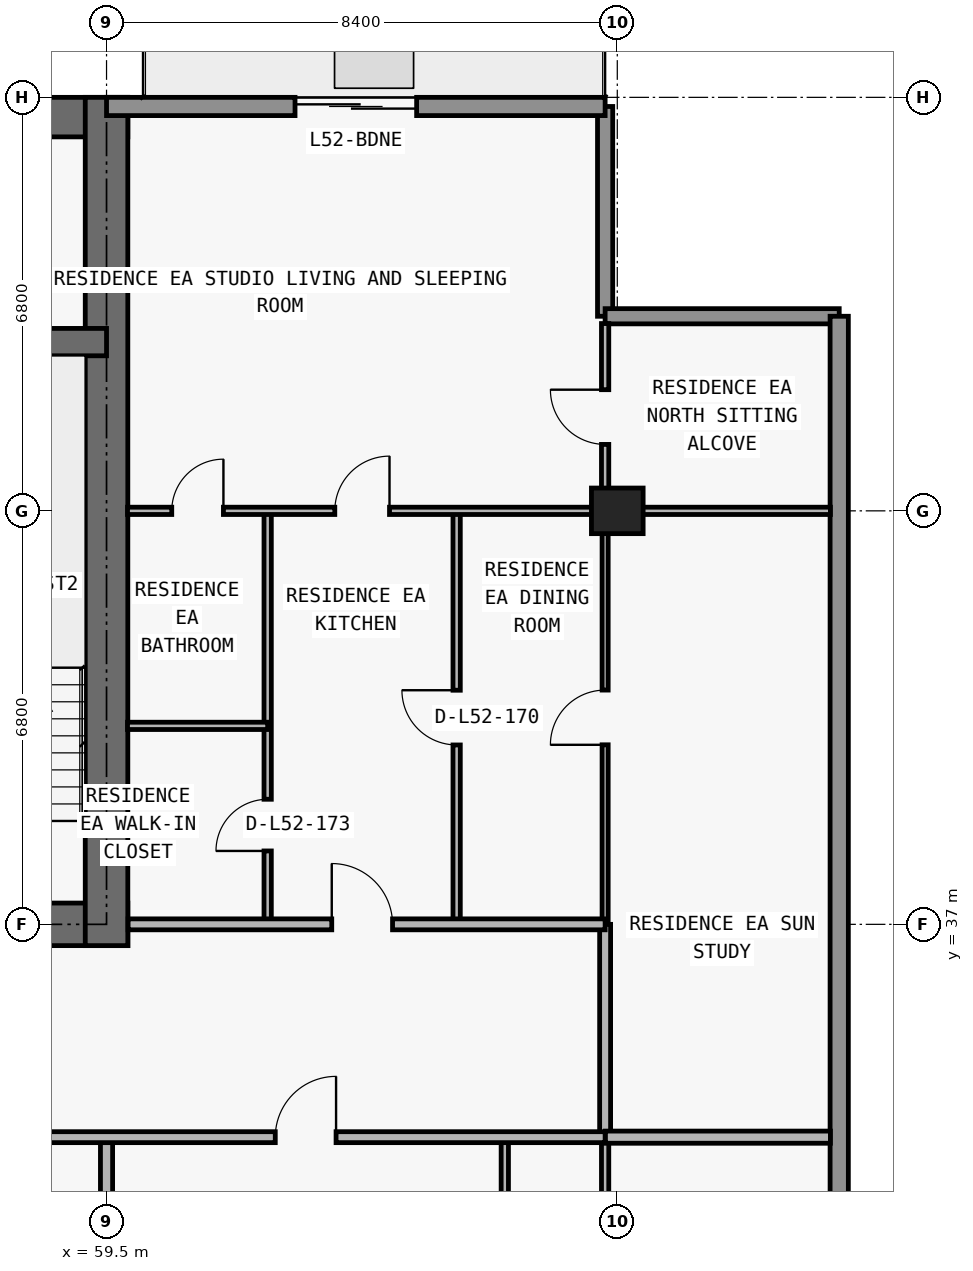
"""IFC4 building model, lengths in metres.
Left out: names, types, materials, properties, quantities, classifications, styles, units other than length and angle.
Written with IfcOpenShell. Run it as: python <this file> out.ifc"""

import sys

from ifc_helpers import new_model, si_unit, direction, frame, frame_2d, origin, origin_2d, place, context, subcontext, project, spatial, rectangle, extrude, element, fill, save


model = new_model("IFC4")
c1 = context("Model", 3, precision=1e-05, world=origin(), true_north=direction((0.0, 1.0)))
c2 = subcontext(c1, "Body", "Model", "MODEL_VIEW")
j1 = project(units=[si_unit("LENGTHUNIT", "METRE"), si_unit("PLANEANGLEUNIT", "RADIAN")], contexts=[c1])
p1 = place(None, origin())
s1 = spatial("IfcSite", under=j1, at=p1, CompositionType="ELEMENT")
p2 = place(p1, origin())
s2 = spatial("IfcBuilding", under=s1, at=p2, CompositionType="ELEMENT")
p3 = place(p2, frame((0.0, 0.0, 188.4)))
s3 = spatial("IfcBuildingStorey", under=s2, at=p3, CompositionType="ELEMENT", Elevation=188.4)
p4 = place(p3, frame((67.9, 43.8, 0.0), z_axis=(0.0, 0.0, 1.0), x_axis=(1.0, 0.0, 0.0)))
e1 = element("IfcColumn", 1, at=p4, inside=s3, PredefinedType="COLUMN", context=c2, shape_type="SweptSolid", body=[
    extrude(rectangle(XDim=0.85, YDim=0.75, at=origin_2d()), origin(), (0.0, 0.0, 1.0), 3.05),
])
p5 = place(p3, frame((17.95, 37.0, 0.0), z_axis=(0.0, 0.0, 1.0), x_axis=(1.0, 0.0, 0.0)))
e2 = element("IfcWall", 2, at=p5, inside=s3, PredefinedType="SHEAR", context=c2, shape_type="SweptSolid", body=[
    extrude(rectangle(XDim=41.9, YDim=0.7, at=frame_2d((20.95, 0.0))), origin(), (0.0, 0.0, 1.0), 3.05),
])
p6 = place(p5, frame((14.35, 0.0, 0.0)))
e3 = element("IfcOpeningElement", 3, at=p6, cuts=e2, PredefinedType="OPENING", context=c2, shape_type="SweptSolid", body=[
    extrude(rectangle(XDim=1.1, YDim=2.15, at=frame_2d((0.55, 1.075))), frame((0.0, 0.36, 0.0), z_axis=(0.0, -1.0, 0.0), x_axis=(1.0, 0.0, 0.0)), (0.0, 0.0, 1.0), 0.72),
])
p7 = place(p5, frame((6.2, 0.0, 0.0)))
e4 = element("IfcOpeningElement", 4, at=p7, cuts=e2, PredefinedType="OPENING", context=c2, shape_type="SweptSolid", body=[
    extrude(rectangle(XDim=1.05, YDim=2.15, at=frame_2d((0.525, 1.075))), frame((0.0, 0.36, 0.0), z_axis=(0.0, -1.0, 0.0), x_axis=(1.0, 0.0, 0.0)), (0.0, 0.0, 1.0), 0.72),
])
p8 = place(p5, frame((34.7, 0.0, 0.0)))
e5 = element("IfcOpeningElement", 5, at=p8, cuts=e2, PredefinedType="OPENING", context=c2, shape_type="SweptSolid", body=[
    extrude(rectangle(XDim=1.05, YDim=2.15, at=frame_2d((0.525, 1.075))), frame((0.0, 0.36, 0.0), z_axis=(0.0, -1.0, 0.0), x_axis=(1.0, 0.0, 0.0)), (0.0, 0.0, 1.0), 0.72),
])
p9 = place(p5, frame((10.812, 0.0, 0.0)))
e6 = element("IfcOpeningElement", 6, at=p9, cuts=e2, PredefinedType="OPENING", context=c2, shape_type="SweptSolid", body=[
    extrude(rectangle(XDim=1.05, YDim=2.15, at=frame_2d((0.525, 1.075))), frame((0.0, 0.36, 0.0), z_axis=(0.0, -1.0, 0.0), x_axis=(1.0, 0.0, 0.0)), (0.0, 0.0, 1.0), 0.72),
])
p10 = place(p5, frame((24.05, 0.0, 0.0)))
e7 = element("IfcOpeningElement", 7, at=p10, cuts=e2, PredefinedType="OPENING", context=c2, shape_type="SweptSolid", body=[
    extrude(rectangle(XDim=1.05, YDim=2.15, at=frame_2d((0.525, 1.075))), frame((0.0, 0.36, 0.0), z_axis=(0.0, -1.0, 0.0), x_axis=(1.0, 0.0, 0.0)), (0.0, 0.0, 1.0), 0.72),
])
p11 = place(p3, frame((17.95, 50.275, 0.0), z_axis=(0.0, 0.0, 1.0), x_axis=(1.0, 0.0, 0.0)))
e8 = element("IfcWall", 8, at=p11, inside=s3, PredefinedType="SHEAR", context=c2, shape_type="SweptSolid", body=[
    extrude(rectangle(XDim=41.9, YDim=0.65, at=frame_2d((20.95, 0.0))), origin(), (0.0, 0.0, 1.0), 3.05),
])
p12 = place(p3, frame((59.5, 36.65, 0.0), z_axis=(0.0, 0.0, 1.0), x_axis=(0.0, 1.0, 0.0)))
e9 = element("IfcWall", 9, at=p12, inside=s3, PredefinedType="SHEAR", context=c2, shape_type="SweptSolid", body=[
    extrude(rectangle(XDim=13.95, YDim=0.7, at=frame_2d((6.975, 0.0))), origin(), (0.0, 0.0, 1.0), 3.05),
])
p13 = place(p3, frame((18.3, 46.575, 0.0), z_axis=(0.0, 0.0, 1.0), x_axis=(1.0, 0.0, 0.0)))
e10 = element("IfcWall", 10, at=p13, inside=s3, PredefinedType="SHEAR", context=c2, shape_type="SweptSolid", body=[
    extrude(rectangle(XDim=41.2, YDim=0.45, at=frame_2d((20.6, 0.0))), origin(), (0.0, 0.0, 1.0), 3.05),
])
p14 = place(p13, frame((7.575, 0.0, 0.0)))
e11 = element("IfcOpeningElement", 11, at=p14, cuts=e10, PredefinedType="OPENING", context=c2, shape_type="SweptSolid", body=[
    extrude(rectangle(XDim=1.05, YDim=2.15, at=frame_2d((0.525, 1.075))), frame((0.0, 0.235, 0.0), z_axis=(0.0, -1.0, 0.0), x_axis=(1.0, 0.0, 0.0)), (0.0, 0.0, 1.0), 0.47),
])
p15 = place(p13, frame((32.625, 0.0, 0.0)))
e12 = element("IfcOpeningElement", 12, at=p15, cuts=e10, PredefinedType="OPENING", context=c2, shape_type="SweptSolid", body=[
    extrude(rectangle(XDim=1.05, YDim=2.15, at=frame_2d((0.525, 1.075))), frame((0.0, 0.235, 0.0), z_axis=(0.0, -1.0, 0.0), x_axis=(1.0, 0.0, 0.0)), (0.0, 0.0, 1.0), 0.47),
])
p16 = place(p3, frame((67.7, 50.45, 0.0), z_axis=(0.0, 0.0, 1.0), x_axis=(0.0, -1.0, 0.0)))
e13 = element("IfcWall", 13, at=p16, inside=s3, PredefinedType="ELEMENTEDWALL", context=c2, shape_type="SweptSolid", body=[
    extrude(rectangle(XDim=3.45, YDim=0.25, at=frame_2d((1.725, 0.0))), origin(), (0.0, 0.0, 1.0), 3.05),
])
p17 = place(p3, frame((67.7, 47.0, 0.0), z_axis=(0.0, 0.0, 1.0), x_axis=(1.0, 0.0, 0.0)))
e14 = element("IfcWall", 14, at=p17, inside=s3, PredefinedType="ELEMENTEDWALL", context=c2, shape_type="SweptSolid", body=[
    extrude(rectangle(XDim=3.85, YDim=0.25, at=frame_2d((1.925, 0.0))), origin(), (0.0, 0.0, 1.0), 3.05),
])
p18 = place(p3, frame((71.55, 47.0, 0.0), z_axis=(0.0, 0.0, 1.0), x_axis=(0.0, -1.0, 0.0)))
e15 = element("IfcWall", 15, at=p18, inside=s3, PredefinedType="STANDARD", context=c2, shape_type="SweptSolid", body=[
    extrude(rectangle(XDim=17.9, YDim=0.3, at=frame_2d((8.95, 0.0))), origin(), (0.0, 0.0, 1.0), 3.05),
])
p19 = place(p3, frame((59.5, 50.45, 0.0), z_axis=(0.0, 0.0, 1.0), x_axis=(1.0, 0.0, 0.0)))
e16 = element("IfcWall", 16, at=p19, inside=s3, PredefinedType="STANDARD", context=c2, shape_type="SweptSolid", body=[
    extrude(rectangle(XDim=8.2, YDim=0.3, at=frame_2d((4.1, 0.0))), origin(), (0.0, 0.0, 1.0), 3.05),
])
p20 = place(p19, frame((3.1, 0.0, 0.0)))
e17 = element("IfcOpeningElement", 17, at=p20, cuts=e16, PredefinedType="OPENING", context=c2, shape_type="SweptSolid", body=[
    extrude(rectangle(XDim=2.0, YDim=2.3, at=frame_2d((1.0, 1.15))), frame((0.0, 0.16, 0.0), z_axis=(0.0, -1.0, 0.0), x_axis=(1.0, 0.0, 0.0)), (0.0, 0.0, 1.0), 0.32),
])
p21 = place(p3, frame((59.5, 27.18, 0.0), z_axis=(0.0, 0.0, 1.0), x_axis=(0.0, 1.0, 0.0)))
e18 = element("IfcWall", 18, at=p21, inside=s3, PredefinedType="PARTITIONING", context=c2, shape_type="SweptSolid", body=[
    extrude(rectangle(XDim=6.32, YDim=0.2, at=frame_2d((3.16, 0.0))), origin(), (0.0, 0.0, 1.0), 2.263),
])
p22 = place(p3, frame((62.15, 37.0, 0.0), z_axis=(0.0, 0.0, 1.0), x_axis=(0.0, 1.0, 0.0)))
e19 = element("IfcWall", 19, at=p22, inside=s3, PredefinedType="PARTITIONING", context=c2, shape_type="SweptSolid", body=[
    extrude(rectangle(XDim=6.8, YDim=0.12, at=frame_2d((3.4, 0.0))), origin(), (0.0, 0.0, 1.0), 2.578),
])
p23 = place(p22, frame((1.207, 0.0, 0.0)))
e20 = element("IfcOpeningElement", 20, at=p23, cuts=e19, PredefinedType="OPENING", context=c2, shape_type="SweptSolid", body=[
    extrude(rectangle(XDim=0.85, YDim=2.1, at=frame_2d((0.425, 1.05))), frame((0.0, 0.07, 0.0), z_axis=(0.0, -1.0, 0.0), x_axis=(1.0, 0.0, 0.0)), (0.0, 0.0, 1.0), 0.14),
])
p24 = place(p3, frame((65.258, 37.0, 0.0), z_axis=(0.0, 0.0, 1.0), x_axis=(0.0, 1.0, 0.0)))
e21 = element("IfcWall", 21, at=p24, inside=s3, PredefinedType="PARTITIONING", context=c2, shape_type="SweptSolid", body=[
    extrude(rectangle(XDim=6.8, YDim=0.12, at=frame_2d((3.4, 0.0))), origin(), (0.0, 0.0, 1.0), 2.679),
])
p25 = place(p24, frame((2.95, 0.0, 0.0)))
e22 = element("IfcOpeningElement", 22, at=p25, cuts=e21, PredefinedType="OPENING", context=c2, shape_type="SweptSolid", body=[
    extrude(rectangle(XDim=0.9, YDim=2.15, at=frame_2d((0.45, 1.075))), frame((0.0, 0.07, 0.0), z_axis=(0.0, -1.0, 0.0), x_axis=(1.0, 0.0, 0.0)), (0.0, 0.0, 1.0), 0.14),
])
p26 = place(p3, frame((66.05, 27.18, 0.0), z_axis=(0.0, 0.0, 1.0), x_axis=(0.0, 1.0, 0.0)))
e23 = element("IfcWall", 23, at=p26, inside=s3, PredefinedType="PARTITIONING", context=c2, shape_type="SweptSolid", body=[
    extrude(rectangle(XDim=6.32, YDim=0.12, at=frame_2d((3.16, 0.0))), origin(), (0.0, 0.0, 1.0), 3.05),
])
p27 = place(p26, frame((3.035, 0.0, 0.0)))
e24 = element("IfcOpeningElement", 24, at=p27, cuts=e23, PredefinedType="OPENING", context=c2, shape_type="SweptSolid", body=[
    extrude(rectangle(XDim=0.85, YDim=2.1, at=frame_2d((0.425, 1.05))), frame((0.0, 0.07, 0.0), z_axis=(0.0, -1.0, 0.0), x_axis=(1.0, 0.0, 0.0)), (0.0, 0.0, 1.0), 0.14),
])
p28 = place(p3, frame((67.7, 27.18, 0.0), z_axis=(0.0, 0.0, 1.0), x_axis=(0.0, 1.0, 0.0)))
e25 = element("IfcWall", 25, at=p28, inside=s3, PredefinedType="PARTITIONING", context=c2, shape_type="SweptSolid", body=[
    extrude(rectangle(XDim=6.32, YDim=0.12, at=frame_2d((3.16, 0.0))), origin(), (0.0, 0.0, 1.0), 2.263),
])
p29 = place(p3, frame((67.7, 33.505, 0.0), z_axis=(0.0, 0.0, 1.0), x_axis=(0.0, 1.0, 0.0)))
e26 = element("IfcWall", 26, at=p29, inside=s3, PredefinedType="PARTITIONING", context=c2, shape_type="SweptSolid", body=[
    extrude(rectangle(XDim=3.495, YDim=0.18, at=frame_2d((1.748, 0.0))), origin(), (0.0, 0.0, 1.0), 2.263),
])
p30 = place(p3, frame((67.7, 37.005, 0.0), z_axis=(0.0, 0.0, 1.0), x_axis=(0.0, 1.0, 0.0)))
e27 = element("IfcWall", 27, at=p30, inside=s3, PredefinedType="MOVABLE", context=c2, shape_type="SweptSolid", body=[
    extrude(rectangle(XDim=6.795, YDim=0.1, at=frame_2d((3.397, 0.0))), origin(), (0.0, 0.0, 1.0), 2.263),
])
p31 = place(p30, frame((2.948, 0.0, 0.0)))
e28 = element("IfcOpeningElement", 28, at=p31, cuts=e27, PredefinedType="OPENING", context=c2, shape_type="SweptSolid", body=[
    extrude(rectangle(XDim=0.9, YDim=2.15, at=frame_2d((0.45, 1.075))), frame((0.0, 0.06, 0.0), z_axis=(0.0, -1.0, 0.0), x_axis=(1.0, 0.0, 0.0)), (0.0, 0.0, 1.0), 0.12),
])
p32 = place(p3, frame((67.7, 43.805, 0.0), z_axis=(0.0, 0.0, 1.0), x_axis=(0.0, 1.0, 0.0)))
e29 = element("IfcWall", 29, at=p32, inside=s3, PredefinedType="PARTITIONING", context=c2, shape_type="SweptSolid", body=[
    extrude(rectangle(XDim=3.075, YDim=0.12, at=frame_2d((1.538, 0.0))), origin(), (0.0, 0.0, 1.0), 3.05),
])
p33 = place(p32, frame((1.087, 0.0, 0.0)))
e30 = element("IfcOpeningElement", 30, at=p33, cuts=e29, PredefinedType="OPENING", context=c2, shape_type="SweptSolid", body=[
    extrude(rectangle(XDim=0.9, YDim=2.15, at=frame_2d((0.45, 1.075))), frame((0.0, 0.07, 0.0), z_axis=(0.0, -1.0, 0.0), x_axis=(1.0, 0.0, 0.0)), (0.0, 0.0, 1.0), 0.14),
])
p34 = place(p3, frame((31.4, 33.5, 0.0), z_axis=(0.0, 0.0, 1.0), x_axis=(1.0, 0.0, 0.0)))
e31 = element("IfcWall", 31, at=p34, inside=s3, PredefinedType="PARTITIONING", context=c2, shape_type="SweptSolid", body=[
    extrude(rectangle(XDim=36.3, YDim=0.18, at=frame_2d((18.15, 0.0))), origin(), (0.0, 0.0, 1.0), 3.05),
])
p35 = place(p34, frame((6.231, 0.0, 0.0)))
e32 = element("IfcOpeningElement", 32, at=p35, cuts=e31, PredefinedType="OPENING", context=c2, shape_type="SweptSolid", body=[
    extrude(rectangle(XDim=1.0, YDim=2.2, at=frame_2d((0.5, 1.1))), frame((0.0, 0.1, 0.0), z_axis=(0.0, -1.0, 0.0), x_axis=(1.0, 0.0, 0.0)), (0.0, 0.0, 1.0), 0.2),
])
p36 = place(p34, frame((22.575, 0.0, 0.0)))
e33 = element("IfcOpeningElement", 33, at=p36, cuts=e31, PredefinedType="OPENING", context=c2, shape_type="SweptSolid", body=[
    extrude(rectangle(XDim=1.0, YDim=2.2, at=frame_2d((0.5, 1.1))), frame((0.0, 0.1, 0.0), z_axis=(0.0, -1.0, 0.0), x_axis=(1.0, 0.0, 0.0)), (0.0, 0.0, 1.0), 0.2),
])
p37 = place(p34, frame((30.875, 0.0, 0.0)))
e34 = element("IfcOpeningElement", 34, at=p37, cuts=e31, PredefinedType="OPENING", context=c2, shape_type="SweptSolid", body=[
    extrude(rectangle(XDim=1.0, YDim=2.2, at=frame_2d((0.5, 1.1))), frame((0.0, 0.1, 0.0), z_axis=(0.0, -1.0, 0.0), x_axis=(1.0, 0.0, 0.0)), (0.0, 0.0, 1.0), 0.2),
])
p38 = place(p3, frame((67.705, 33.5, 0.0), z_axis=(0.0, 0.0, 1.0), x_axis=(1.0, 0.0, 0.0)))
e35 = element("IfcWall", 35, at=p38, inside=s3, PredefinedType="PARTITIONING", context=c2, shape_type="SweptSolid", body=[
    extrude(rectangle(XDim=3.7, YDim=0.2, at=frame_2d((1.85, 0.0))), origin(), (0.0, 0.0, 1.0), 3.05),
])
p39 = place(p3, frame((59.855, 37.0, 0.0), z_axis=(0.0, 0.0, 1.0), x_axis=(1.0, 0.0, 0.0)))
e36 = element("IfcWall", 36, at=p39, inside=s3, PredefinedType="PARTITIONING", context=c2, shape_type="SweptSolid", body=[
    extrude(rectangle(XDim=7.845, YDim=0.18, at=frame_2d((3.922, 0.0))), origin(), (0.0, 0.0, 1.0), 3.05),
])
p40 = place(p39, frame((3.349, 0.0, 0.0)))
e37 = element("IfcOpeningElement", 37, at=p40, cuts=e36, PredefinedType="OPENING", context=c2, shape_type="SweptSolid", body=[
    extrude(rectangle(XDim=1.0, YDim=2.2, at=frame_2d((0.5, 1.1))), frame((0.0, 0.1, 0.0), z_axis=(0.0, -1.0, 0.0), x_axis=(1.0, 0.0, 0.0)), (0.0, 0.0, 1.0), 0.2),
])
p41 = place(p3, frame((59.845, 40.264, 0.0), z_axis=(0.0, 0.0, 1.0), x_axis=(1.0, 0.0, 0.0)))
e38 = element("IfcWall", 38, at=p41, inside=s3, PredefinedType="PARTITIONING", context=c2, shape_type="SweptSolid", body=[
    extrude(rectangle(XDim=2.305, YDim=0.12, at=frame_2d((1.152, 0.0))), origin(), (0.0, 0.0, 1.0), 3.05),
])
p42 = place(p3, frame((59.845, 43.8, 0.0), z_axis=(0.0, 0.0, 1.0), x_axis=(1.0, 0.0, 0.0)))
e39 = element("IfcWall", 39, at=p42, inside=s3, PredefinedType="PARTITIONING", context=c2, shape_type="SweptSolid", body=[
    extrude(rectangle(XDim=11.56, YDim=0.12, at=frame_2d((5.78, 0.0))), origin(), (0.0, 0.0, 1.0), 2.418),
])
p43 = place(p42, frame((3.409, 0.0, 0.0)))
e40 = element("IfcOpeningElement", 40, at=p43, cuts=e39, PredefinedType="OPENING", context=c2, shape_type="SweptSolid", body=[
    extrude(rectangle(XDim=0.9, YDim=2.15, at=frame_2d((0.45, 1.075))), frame((0.0, 0.07, 0.0), z_axis=(0.0, -1.0, 0.0), x_axis=(1.0, 0.0, 0.0)), (0.0, 0.0, 1.0), 0.14),
])
p44 = place(p42, frame((0.728, 0.0, 0.0)))
e41 = element("IfcOpeningElement", 41, at=p44, cuts=e39, PredefinedType="OPENING", context=c2, shape_type="SweptSolid", body=[
    extrude(rectangle(XDim=0.85, YDim=2.1, at=frame_2d((0.425, 1.05))), frame((0.0, 0.07, 0.0), z_axis=(0.0, -1.0, 0.0), x_axis=(1.0, 0.0, 0.0)), (0.0, 0.0, 1.0), 0.14),
])
p45 = place(p20, origin())
e42 = element("IfcDoor", 42, at=p45, inside=s3, OperationType="DOUBLE_DOOR_SLIDING", PredefinedType="DOOR", context=c2, shape_type="SweptSolid", body=[
    extrude(rectangle(XDim=2.0, YDim=2.3, at=frame_2d((1.0, 1.15))), frame((0.0, 0.025, 0.0), z_axis=(0.0, -1.0, 0.0), x_axis=(1.0, 0.0, 0.0)), (0.0, 0.0, 1.0), 0.05),
])
fill(e17, e42)
p46 = place(p37, origin())
e43 = element("IfcDoor", 43, at=p46, inside=s3, OperationType="SINGLE_SWING_RIGHT", PredefinedType="DOOR", context=c2, shape_type="SweptSolid", body=[
    extrude(rectangle(XDim=1.0, YDim=2.2, at=frame_2d((0.5, 1.1))), frame((0.0, 0.025, 0.0), z_axis=(0.0, -1.0, 0.0), x_axis=(1.0, 0.0, 0.0)), (0.0, 0.0, 1.0), 0.05),
])
fill(e34, e43)
p47 = place(p25, origin())
e44 = element("IfcDoor", 44, at=p47, inside=s3, OperationType="SINGLE_SWING_RIGHT", PredefinedType="DOOR", context=c2, shape_type="SweptSolid", body=[
    extrude(rectangle(XDim=0.9, YDim=2.15, at=frame_2d((0.45, 1.075))), frame((0.0, 0.025, 0.0), z_axis=(0.0, -1.0, 0.0), x_axis=(1.0, 0.0, 0.0)), (0.0, 0.0, 1.0), 0.05),
])
fill(e22, e44)
p48 = place(p40, origin())
e45 = element("IfcDoor", 45, at=p48, inside=s3, OperationType="SINGLE_SWING_LEFT", PredefinedType="DOOR", context=c2, shape_type="SweptSolid", body=[
    extrude(rectangle(XDim=1.0, YDim=2.2, at=frame_2d((0.5, 1.1))), frame((0.0, 0.025, 0.0), z_axis=(0.0, -1.0, 0.0), x_axis=(1.0, 0.0, 0.0)), (0.0, 0.0, 1.0), 0.05),
])
fill(e37, e45)
p49 = place(p43, origin())
e46 = element("IfcDoor", 46, at=p49, inside=s3, OperationType="SINGLE_SWING_RIGHT", PredefinedType="DOOR", context=c2, shape_type="SweptSolid", body=[
    extrude(rectangle(XDim=0.9, YDim=2.15, at=frame_2d((0.45, 1.075))), frame((0.0, 0.025, 0.0), z_axis=(0.0, -1.0, 0.0), x_axis=(1.0, 0.0, 0.0)), (0.0, 0.0, 1.0), 0.05),
])
fill(e40, e46)
p50 = place(p23, origin())
e47 = element("IfcDoor", 47, at=p50, inside=s3, OperationType="SINGLE_SWING_LEFT", PredefinedType="DOOR", context=c2, shape_type="SweptSolid", body=[
    extrude(rectangle(XDim=0.85, YDim=2.1, at=frame_2d((0.425, 1.05))), frame((0.0, 0.025, 0.0), z_axis=(0.0, -1.0, 0.0), x_axis=(1.0, 0.0, 0.0)), (0.0, 0.0, 1.0), 0.05),
])
fill(e20, e47)
p51 = place(p44, origin())
e48 = element("IfcDoor", 48, at=p51, inside=s3, OperationType="SINGLE_SWING_RIGHT", PredefinedType="DOOR", context=c2, shape_type="SweptSolid", body=[
    extrude(rectangle(XDim=0.85, YDim=2.1, at=frame_2d((0.425, 1.05))), frame((0.0, 0.025, 0.0), z_axis=(0.0, -1.0, 0.0), x_axis=(1.0, 0.0, 0.0)), (0.0, 0.0, 1.0), 0.05),
])
fill(e41, e48)
p52 = place(p31, origin())
e49 = element("IfcDoor", 49, at=p52, inside=s3, OperationType="SINGLE_SWING_LEFT", PredefinedType="DOOR", context=c2, shape_type="SweptSolid", body=[
    extrude(rectangle(XDim=0.9, YDim=2.15, at=frame_2d((0.45, 1.075))), frame((0.0, 0.025, 0.0), z_axis=(0.0, -1.0, 0.0), x_axis=(1.0, 0.0, 0.0)), (0.0, 0.0, 1.0), 0.05),
])
fill(e28, e49)
p53 = place(p33, origin())
e50 = element("IfcDoor", 50, at=p53, inside=s3, OperationType="SINGLE_SWING_RIGHT", PredefinedType="DOOR", context=c2, shape_type="SweptSolid", body=[
    extrude(rectangle(XDim=0.9, YDim=2.15, at=frame_2d((0.45, 1.075))), frame((0.0, 0.025, 0.0), z_axis=(0.0, -1.0, 0.0), x_axis=(1.0, 0.0, 0.0)), (0.0, 0.0, 1.0), 0.05),
])
fill(e30, e50)
save(model, sys.argv[1])
